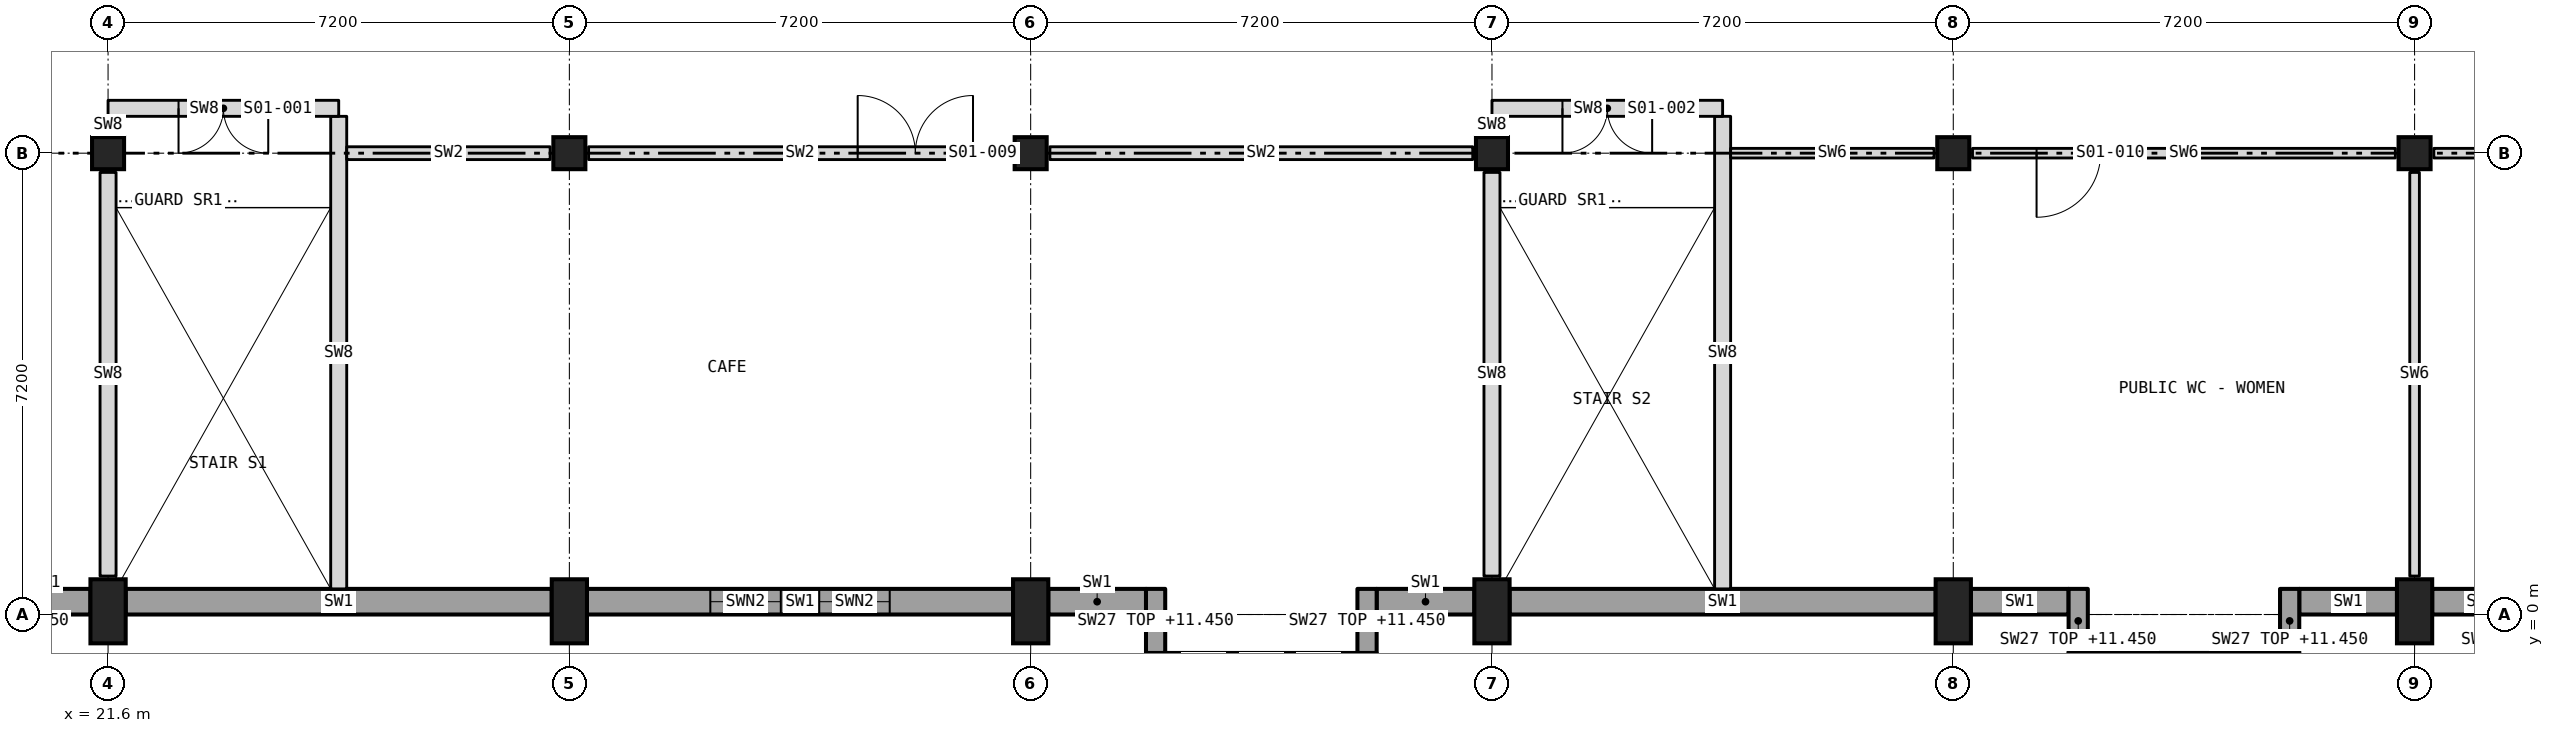
"""IFC4 building model, lengths in metres.
Left out: names, types, materials, properties, quantities, classifications, styles, units other than length and angle.
Written with IfcOpenShell. Run it as: python <this file> out.ifc"""

import sys

from ifc_helpers import new_model, si_unit, direction, frame, frame_2d, origin, origin_2d, place, context, subcontext, project, spatial, rectangle, extrude, element, fill, save


model = new_model("IFC4")
c1 = context("Model", 3, precision=1e-05, world=origin(), true_north=direction((0.0, 1.0)))
c2 = subcontext(c1, "Body", "Model", "MODEL_VIEW")
j1 = project(units=[si_unit("LENGTHUNIT", "METRE"), si_unit("PLANEANGLEUNIT", "RADIAN")], contexts=[c1])
p1 = place(None, origin())
s1 = spatial("IfcSite", under=j1, at=p1, CompositionType="ELEMENT")
p2 = place(p1, origin())
s2 = spatial("IfcBuilding", under=s1, at=p2, CompositionType="ELEMENT")
p3 = place(p2, frame((0.0, 0.0, 6.0)))
s3 = spatial("IfcBuildingStorey", under=s2, at=p3, CompositionType="ELEMENT", Elevation=6.0)
p4 = place(p3, frame((21.6, 0.05, 0.0), z_axis=(0.0, 0.0, 1.0), x_axis=(1.0, 0.0, 0.0)))
e1 = element("IfcColumn", 1, at=p4, inside=s3, PredefinedType="COLUMN", context=c2, shape_type="SweptSolid", body=[
    extrude(rectangle(XDim=0.55, YDim=1.0, at=origin_2d()), origin(), (0.0, 0.0, 1.0), 6.0),
])
p5 = place(p3, frame((21.6, 7.2, 0.0), z_axis=(0.0, 0.0, 1.0), x_axis=(1.0, 0.0, 0.0)))
e2 = element("IfcColumn", 2, at=p5, inside=s3, PredefinedType="COLUMN", context=c2, shape_type="SweptSolid", body=[
    extrude(rectangle(XDim=0.5, YDim=0.5, at=origin_2d()), origin(), (0.0, 0.0, 1.0), 6.0),
])
p6 = place(p3, frame((28.8, 0.05, 0.0), z_axis=(0.0, 0.0, 1.0), x_axis=(1.0, 0.0, 0.0)))
e3 = element("IfcColumn", 3, at=p6, inside=s3, PredefinedType="COLUMN", context=c2, shape_type="SweptSolid", body=[
    extrude(rectangle(XDim=0.55, YDim=1.0, at=origin_2d()), origin(), (0.0, 0.0, 1.0), 6.0),
])
p7 = place(p3, frame((28.8, 7.2, 0.0), z_axis=(0.0, 0.0, 1.0), x_axis=(1.0, 0.0, 0.0)))
e4 = element("IfcColumn", 4, at=p7, inside=s3, PredefinedType="COLUMN", context=c2, shape_type="SweptSolid", body=[
    extrude(rectangle(XDim=0.5, YDim=0.5, at=origin_2d()), origin(), (0.0, 0.0, 1.0), 6.0),
])
p8 = place(p3, frame((36.0, 0.05, 0.0), z_axis=(0.0, 0.0, 1.0), x_axis=(1.0, 0.0, 0.0)))
e5 = element("IfcColumn", 5, at=p8, inside=s3, PredefinedType="COLUMN", context=c2, shape_type="SweptSolid", body=[
    extrude(rectangle(XDim=0.55, YDim=1.0, at=origin_2d()), origin(), (0.0, 0.0, 1.0), 6.0),
])
p9 = place(p3, frame((36.0, 7.2, 0.0), z_axis=(0.0, 0.0, 1.0), x_axis=(1.0, 0.0, 0.0)))
e6 = element("IfcColumn", 6, at=p9, inside=s3, PredefinedType="COLUMN", context=c2, shape_type="SweptSolid", body=[
    extrude(rectangle(XDim=0.5, YDim=0.5, at=origin_2d()), origin(), (0.0, 0.0, 1.0), 6.0),
])
p10 = place(p3, frame((43.2, 0.05, 0.0), z_axis=(0.0, 0.0, 1.0), x_axis=(1.0, 0.0, 0.0)))
e7 = element("IfcColumn", 7, at=p10, inside=s3, PredefinedType="COLUMN", context=c2, shape_type="SweptSolid", body=[
    extrude(rectangle(XDim=0.55, YDim=1.0, at=origin_2d()), origin(), (0.0, 0.0, 1.0), 6.0),
])
p11 = place(p3, frame((43.2, 7.2, 0.0), z_axis=(0.0, 0.0, 1.0), x_axis=(1.0, 0.0, 0.0)))
e8 = element("IfcColumn", 8, at=p11, inside=s3, PredefinedType="COLUMN", context=c2, shape_type="SweptSolid", body=[
    extrude(rectangle(XDim=0.5, YDim=0.5, at=origin_2d()), origin(), (0.0, 0.0, 1.0), 6.0),
])
p12 = place(p3, frame((50.4, 0.05, 0.0), z_axis=(0.0, 0.0, 1.0), x_axis=(1.0, 0.0, 0.0)))
e9 = element("IfcColumn", 9, at=p12, inside=s3, PredefinedType="COLUMN", context=c2, shape_type="SweptSolid", body=[
    extrude(rectangle(XDim=0.55, YDim=1.0, at=origin_2d()), origin(), (0.0, 0.0, 1.0), 6.0),
])
p13 = place(p3, frame((50.4, 7.2, 0.0), z_axis=(0.0, 0.0, 1.0), x_axis=(1.0, 0.0, 0.0)))
e10 = element("IfcColumn", 10, at=p13, inside=s3, PredefinedType="COLUMN", context=c2, shape_type="SweptSolid", body=[
    extrude(rectangle(XDim=0.5, YDim=0.5, at=origin_2d()), origin(), (0.0, 0.0, 1.0), 6.0),
])
p14 = place(p3, frame((57.6, 0.05, 0.0), z_axis=(0.0, 0.0, 1.0), x_axis=(1.0, 0.0, 0.0)))
e11 = element("IfcColumn", 11, at=p14, inside=s3, PredefinedType="COLUMN", context=c2, shape_type="SweptSolid", body=[
    extrude(rectangle(XDim=0.55, YDim=1.0, at=origin_2d()), origin(), (0.0, 0.0, 1.0), 6.0),
])
p15 = place(p3, frame((57.6, 7.2, 0.0), z_axis=(0.0, 0.0, 1.0), x_axis=(1.0, 0.0, 0.0)))
e12 = element("IfcColumn", 12, at=p15, inside=s3, PredefinedType="COLUMN", context=c2, shape_type="SweptSolid", body=[
    extrude(rectangle(XDim=0.5, YDim=0.5, at=origin_2d()), origin(), (0.0, 0.0, 1.0), 6.0),
])
p16 = place(p3, frame((19.913, 0.2, 0.0), z_axis=(0.0, 0.0, 1.0), x_axis=(1.0, 0.0, 0.0)))
e13 = element("IfcWall", 13, at=p16, inside=s3, PredefinedType="SOLIDWALL", context=c2, shape_type="SweptSolid", body=[
    extrude(rectangle(XDim=1.412, YDim=0.4, at=frame_2d((0.706, 0.0))), origin(), (0.0, 0.0, 1.0), 5.725),
])
p17 = place(p3, frame((21.875, 0.2, 0.0), z_axis=(0.0, 0.0, 1.0), x_axis=(1.0, 0.0, 0.0)))
e14 = element("IfcWall", 14, at=p17, inside=s3, PredefinedType="SOLIDWALL", context=c2, shape_type="SweptSolid", body=[
    extrude(rectangle(XDim=6.65, YDim=0.4, at=frame_2d((3.325, 0.0))), origin(), (0.0, 0.0, 1.0), 5.725),
])
p18 = place(p3, frame((29.075, 0.2, 0.0), z_axis=(0.0, 0.0, 1.0), x_axis=(1.0, 0.0, 0.0)))
e15 = element("IfcWall", 15, at=p18, inside=s3, PredefinedType="SOLIDWALL", context=c2, shape_type="SweptSolid", body=[
    extrude(rectangle(XDim=6.65, YDim=0.4, at=frame_2d((3.325, 0.0))), origin(), (0.0, 0.0, 1.0), 5.725),
])
p19 = place(p18, frame((1.925, 0.0, 0.9)))
e16 = element("IfcOpeningElement", 16, at=p19, cuts=e15, PredefinedType="OPENING", context=c2, shape_type="SweptSolid", body=[
    extrude(rectangle(XDim=1.1, YDim=2.4, at=frame_2d((0.55, 1.2))), frame((0.0, 0.21, 0.0), z_axis=(0.0, -1.0, 0.0), x_axis=(1.0, 0.0, 0.0)), (0.0, 0.0, 1.0), 0.42),
])
p20 = place(p18, frame((3.625, 0.0, 0.9)))
e17 = element("IfcOpeningElement", 17, at=p20, cuts=e15, PredefinedType="OPENING", context=c2, shape_type="SweptSolid", body=[
    extrude(rectangle(XDim=1.1, YDim=2.4, at=frame_2d((0.55, 1.2))), frame((0.0, 0.21, 0.0), z_axis=(0.0, -1.0, 0.0), x_axis=(1.0, 0.0, 0.0)), (0.0, 0.0, 1.0), 0.42),
])
for number, where, z_axis, x_axis in (
    (18, (36.275, 0.2, 0.0), (0.0, 0.0, 1.0), (1.0, 0.0, 0.0)),
    (19, (41.4, 0.2, 0.0), (0.0, 0.0, 1.0), (1.0, 0.0, 0.0)),
):
    element("IfcWall", number, at=place(p3, frame(where, z_axis=z_axis, x_axis=x_axis)), inside=s3, PredefinedType="SOLIDWALL", context=c2, shape_type="SweptSolid", body=[
        extrude(rectangle(XDim=1.525, YDim=0.4, at=frame_2d((0.763, 0.0))), origin(), (0.0, 0.0, 1.0), 5.725),
    ])
p21 = place(p3, frame((43.475, 0.2, 0.0), z_axis=(0.0, 0.0, 1.0), x_axis=(1.0, 0.0, 0.0)))
e20 = element("IfcWall", 20, at=p21, inside=s3, PredefinedType="SOLIDWALL", context=c2, shape_type="SweptSolid", body=[
    extrude(rectangle(XDim=6.65, YDim=0.4, at=frame_2d((3.325, 0.0))), origin(), (0.0, 0.0, 1.0), 5.725),
])
for number, where, z_axis, x_axis in (
    (21, (50.675, 0.2, 0.0), (0.0, 0.0, 1.0), (1.0, 0.0, 0.0)),
    (22, (55.8, 0.2, 0.0), (0.0, 0.0, 1.0), (1.0, 0.0, 0.0)),
    (23, (57.875, 0.2, 0.0), (0.0, 0.0, 1.0), (1.0, 0.0, 0.0)),
):
    element("IfcWall", number, at=place(p3, frame(where, z_axis=z_axis, x_axis=x_axis)), inside=s3, PredefinedType="SOLIDWALL", context=c2, shape_type="SweptSolid", body=[
        extrude(rectangle(XDim=1.525, YDim=0.4, at=frame_2d((0.762, 0.0))), origin(), (0.0, 0.0, 1.0), 5.725),
    ])
p22 = place(p3, frame((37.8, -0.75, 0.0), z_axis=(0.0, 0.0, 1.0), x_axis=(1.0, 0.0, 0.0)))
e24 = element("IfcWall", 24, at=p22, inside=s3, PredefinedType="SOLIDWALL", context=c2, shape_type="SweptSolid", body=[
    extrude(rectangle(XDim=3.6, YDim=0.3, at=frame_2d((1.8, 0.0))), origin(), (0.0, 0.0, 1.0), 5.45),
])
p23 = place(p22, frame((0.3, 0.0, 0.9)))
e25 = element("IfcOpeningElement", 25, at=p23, cuts=e24, PredefinedType="OPENING", context=c2, shape_type="SweptSolid", body=[
    extrude(rectangle(XDim=1.2, YDim=3.6, at=frame_2d((0.6, 1.8))), frame((0.0, 0.16, 0.0), z_axis=(0.0, -1.0, 0.0), x_axis=(1.0, 0.0, 0.0)), (0.0, 0.0, 1.0), 0.32),
])
p24 = place(p22, frame((2.1, 0.0, 0.9)))
e26 = element("IfcOpeningElement", 26, at=p24, cuts=e24, PredefinedType="OPENING", context=c2, shape_type="SweptSolid", body=[
    extrude(rectangle(XDim=1.2, YDim=3.6, at=frame_2d((0.6, 1.8))), frame((0.0, 0.16, 0.0), z_axis=(0.0, -1.0, 0.0), x_axis=(1.0, 0.0, 0.0)), (0.0, 0.0, 1.0), 0.32),
])
for number, where, z_axis, x_axis in (
    (27, (37.95, -0.6, 0.0), (0.0, 0.0, 1.0), (0.0, 1.0, 0.0)),
    (28, (41.25, -0.6, 0.0), (0.0, 0.0, 1.0), (0.0, 1.0, 0.0)),
):
    element("IfcWall", number, at=place(p3, frame(where, z_axis=z_axis, x_axis=x_axis)), inside=s3, PredefinedType="SOLIDWALL", context=c2, shape_type="SweptSolid", body=[
        extrude(rectangle(XDim=1.0, YDim=0.3, at=frame_2d((0.5, 0.0))), origin(), (0.0, 0.0, 1.0), 5.45),
    ])
p25 = place(p3, frame((52.2, -0.75, 0.0), z_axis=(0.0, 0.0, 1.0), x_axis=(1.0, 0.0, 0.0)))
e29 = element("IfcWall", 29, at=p25, inside=s3, PredefinedType="SOLIDWALL", context=c2, shape_type="SweptSolid", body=[
    extrude(rectangle(XDim=3.6, YDim=0.3, at=frame_2d((1.8, 0.0))), origin(), (0.0, 0.0, 1.0), 5.45),
])
p26 = place(p25, frame((0.3, 0.0, 0.9)))
e30 = element("IfcOpeningElement", 30, at=p26, cuts=e29, PredefinedType="OPENING", context=c2, shape_type="SweptSolid", body=[
    extrude(rectangle(XDim=1.2, YDim=3.6, at=frame_2d((0.6, 1.8))), frame((0.0, 0.16, 0.0), z_axis=(0.0, -1.0, 0.0), x_axis=(1.0, 0.0, 0.0)), (0.0, 0.0, 1.0), 0.32),
])
p27 = place(p25, frame((2.1, 0.0, 0.9)))
e31 = element("IfcOpeningElement", 31, at=p27, cuts=e29, PredefinedType="OPENING", context=c2, shape_type="SweptSolid", body=[
    extrude(rectangle(XDim=1.2, YDim=3.6, at=frame_2d((0.6, 1.8))), frame((0.0, 0.16, 0.0), z_axis=(0.0, -1.0, 0.0), x_axis=(1.0, 0.0, 0.0)), (0.0, 0.0, 1.0), 0.32),
])
for number, where, z_axis, x_axis in (
    (32, (52.35, -0.6, 0.0), (0.0, 0.0, 1.0), (0.0, 1.0, 0.0)),
    (33, (55.65, -0.6, 0.0), (0.0, 0.0, 1.0), (0.0, 1.0, 0.0)),
):
    element("IfcWall", number, at=place(p3, frame(where, z_axis=z_axis, x_axis=x_axis)), inside=s3, PredefinedType="SOLIDWALL", context=c2, shape_type="SweptSolid", body=[
        extrude(rectangle(XDim=1.0, YDim=0.3, at=frame_2d((0.5, 0.0))), origin(), (0.0, 0.0, 1.0), 5.45),
    ])
p28 = place(p3, frame((21.6, 0.6, 0.0), z_axis=(0.0, 0.0, 1.0), x_axis=(0.0, 1.0, 0.0)))
e34 = element("IfcWall", 34, at=p28, inside=s3, PredefinedType="SOLIDWALL", context=c2, shape_type="SweptSolid", body=[
    extrude(rectangle(XDim=6.3, YDim=0.25, at=frame_2d((3.15, 0.0))), origin(), (0.0, 0.0, 1.0), 5.725),
])
p29 = place(p3, frame((21.6, 7.5, 0.0), z_axis=(0.0, 0.0, 1.0), x_axis=(0.0, 1.0, 0.0)))
e35 = element("IfcWall", 35, at=p29, inside=s3, PredefinedType="SOLIDWALL", context=c2, shape_type="SweptSolid", body=[
    extrude(rectangle(XDim=0.275, YDim=0.25, at=frame_2d((0.137, 0.0))), origin(), (0.0, 0.0, 1.0), 5.725),
])
p30 = place(p3, frame((25.2, 0.4, 0.0), z_axis=(0.0, 0.0, 1.0), x_axis=(0.0, 1.0, 0.0)))
e36 = element("IfcWall", 36, at=p30, inside=s3, PredefinedType="SOLIDWALL", context=c2, shape_type="SweptSolid", body=[
    extrude(rectangle(XDim=7.375, YDim=0.25, at=frame_2d((3.688, 0.0))), origin(), (0.0, 0.0, 1.0), 5.725),
])
p31 = place(p3, frame((43.2, 0.6, 0.0), z_axis=(0.0, 0.0, 1.0), x_axis=(0.0, 1.0, 0.0)))
e37 = element("IfcWall", 37, at=p31, inside=s3, PredefinedType="SOLIDWALL", context=c2, shape_type="SweptSolid", body=[
    extrude(rectangle(XDim=6.3, YDim=0.25, at=frame_2d((3.15, 0.0))), origin(), (0.0, 0.0, 1.0), 5.725),
])
p32 = place(p3, frame((43.2, 7.5, 0.0), z_axis=(0.0, 0.0, 1.0), x_axis=(0.0, 1.0, 0.0)))
e38 = element("IfcWall", 38, at=p32, inside=s3, PredefinedType="SOLIDWALL", context=c2, shape_type="SweptSolid", body=[
    extrude(rectangle(XDim=0.275, YDim=0.25, at=frame_2d((0.137, 0.0))), origin(), (0.0, 0.0, 1.0), 5.725),
])
p33 = place(p3, frame((46.8, 0.4, 0.0), z_axis=(0.0, 0.0, 1.0), x_axis=(0.0, 1.0, 0.0)))
e39 = element("IfcWall", 39, at=p33, inside=s3, PredefinedType="SOLIDWALL", context=c2, shape_type="SweptSolid", body=[
    extrude(rectangle(XDim=7.375, YDim=0.25, at=frame_2d((3.688, 0.0))), origin(), (0.0, 0.0, 1.0), 5.725),
])
p34 = place(p3, frame((57.6, 0.6, 0.0), z_axis=(0.0, 0.0, 1.0), x_axis=(0.0, 1.0, 0.0)))
e40 = element("IfcWall", 40, at=p34, inside=s3, PredefinedType="PARTITIONING", context=c2, shape_type="SweptSolid", body=[
    extrude(rectangle(XDim=6.3, YDim=0.15, at=frame_2d((3.15, 0.0))), origin(), (0.0, 0.0, 1.0), 5.725),
])
p35 = place(p3, frame((46.925, 7.2, 0.0), z_axis=(0.0, 0.0, 1.0), x_axis=(1.0, 0.0, 0.0)))
e41 = element("IfcWall", 41, at=p35, inside=s3, PredefinedType="PARTITIONING", context=c2, shape_type="SweptSolid", body=[
    extrude(rectangle(XDim=3.175, YDim=0.15, at=frame_2d((1.587, 0.0))), origin(), (0.0, 0.0, 1.0), 5.725),
])
p36 = place(p3, frame((50.7, 7.2, 0.0), z_axis=(0.0, 0.0, 1.0), x_axis=(1.0, 0.0, 0.0)))
e42 = element("IfcWall", 42, at=p36, inside=s3, PredefinedType="PARTITIONING", context=c2, shape_type="SweptSolid", body=[
    extrude(rectangle(XDim=6.6, YDim=0.15, at=frame_2d((3.3, 0.0))), origin(), (0.0, 0.0, 1.0), 5.725),
])
p37 = place(p36, frame((1.0, 0.0, 0.0)))
e43 = element("IfcOpeningElement", 43, at=p37, cuts=e42, PredefinedType="OPENING", context=c2, shape_type="SweptSolid", body=[
    extrude(rectangle(XDim=1.0, YDim=2.1, at=frame_2d((0.5, 1.05))), frame((0.0, 0.085, 0.0), z_axis=(0.0, -1.0, 0.0), x_axis=(1.0, 0.0, 0.0)), (0.0, 0.0, 1.0), 0.17),
])
p38 = place(p3, frame((57.9, 7.2, 0.0), z_axis=(0.0, 0.0, 1.0), x_axis=(1.0, 0.0, 0.0)))
e44 = element("IfcWall", 44, at=p38, inside=s3, PredefinedType="PARTITIONING", context=c2, shape_type="SweptSolid", body=[
    extrude(rectangle(XDim=6.6, YDim=0.15, at=frame_2d((3.3, 0.0))), origin(), (0.0, 0.0, 1.0), 5.725),
])
p39 = place(p38, frame((2.8, 0.0, 0.0)))
e45 = element("IfcOpeningElement", 45, at=p39, cuts=e44, PredefinedType="OPENING", context=c2, shape_type="SweptSolid", body=[
    extrude(rectangle(XDim=1.0, YDim=2.1, at=frame_2d((0.5, 1.05))), frame((0.0, 0.085, 0.0), z_axis=(0.0, -1.0, 0.0), x_axis=(1.0, 0.0, 0.0)), (0.0, 0.0, 1.0), 0.17),
])
p40 = place(p3, frame((25.325, 7.2, 0.0), z_axis=(0.0, 0.0, 1.0), x_axis=(1.0, 0.0, 0.0)))
e46 = element("IfcWall", 46, at=p40, inside=s3, PredefinedType="PARTITIONING", context=c2, shape_type="SweptSolid", body=[
    extrude(rectangle(XDim=3.175, YDim=0.2, at=frame_2d((1.587, 0.0))), origin(), (0.0, 0.0, 1.0), 5.725),
])
p41 = place(p3, frame((29.1, 7.2, 0.0), z_axis=(0.0, 0.0, 1.0), x_axis=(1.0, 0.0, 0.0)))
e47 = element("IfcWall", 47, at=p41, inside=s3, PredefinedType="PARTITIONING", context=c2, shape_type="SweptSolid", body=[
    extrude(rectangle(XDim=6.6, YDim=0.2, at=frame_2d((3.3, 0.0))), origin(), (0.0, 0.0, 1.0), 5.725),
])
p42 = place(p41, frame((4.2, 0.0, 0.0)))
e48 = element("IfcOpeningElement", 48, at=p42, cuts=e47, PredefinedType="OPENING", context=c2, shape_type="SweptSolid", body=[
    extrude(rectangle(XDim=1.8, YDim=2.1, at=frame_2d((0.9, 1.05))), frame((0.0, 0.11, 0.0), z_axis=(0.0, -1.0, 0.0), x_axis=(1.0, 0.0, 0.0)), (0.0, 0.0, 1.0), 0.22),
])
p43 = place(p3, frame((36.3, 7.2, 0.0), z_axis=(0.0, 0.0, 1.0), x_axis=(1.0, 0.0, 0.0)))
e49 = element("IfcWall", 49, at=p43, inside=s3, PredefinedType="PARTITIONING", context=c2, shape_type="SweptSolid", body=[
    extrude(rectangle(XDim=6.6, YDim=0.2, at=frame_2d((3.3, 0.0))), origin(), (0.0, 0.0, 1.0), 5.725),
])
p44 = place(p3, frame((21.6, 7.9, 0.0), z_axis=(0.0, 0.0, 1.0), x_axis=(1.0, 0.0, 0.0)))
e50 = element("IfcWall", 50, at=p44, inside=s3, PredefinedType="SOLIDWALL", context=c2, shape_type="SweptSolid", body=[
    extrude(rectangle(XDim=3.6, YDim=0.25, at=frame_2d((1.8, 0.0))), origin(), (0.0, 0.0, 1.0), 5.725),
])
p45 = place(p44, frame((1.1, 0.0, 0.0)))
e51 = element("IfcOpeningElement", 51, at=p45, cuts=e50, PredefinedType="OPENING", context=c2, shape_type="SweptSolid", body=[
    extrude(rectangle(XDim=1.4, YDim=2.1, at=frame_2d((0.7, 1.05))), frame((0.0, 0.135, 0.0), z_axis=(0.0, -1.0, 0.0), x_axis=(1.0, 0.0, 0.0)), (0.0, 0.0, 1.0), 0.27),
])
p46 = place(p3, frame((43.2, 7.9, 0.0), z_axis=(0.0, 0.0, 1.0), x_axis=(1.0, 0.0, 0.0)))
e52 = element("IfcWall", 52, at=p46, inside=s3, PredefinedType="SOLIDWALL", context=c2, shape_type="SweptSolid", body=[
    extrude(rectangle(XDim=3.6, YDim=0.25, at=frame_2d((1.8, 0.0))), origin(), (0.0, 0.0, 1.0), 5.725),
])
p47 = place(p46, frame((1.1, 0.0, 0.0)))
e53 = element("IfcOpeningElement", 53, at=p47, cuts=e52, PredefinedType="OPENING", context=c2, shape_type="SweptSolid", body=[
    extrude(rectangle(XDim=1.4, YDim=2.1, at=frame_2d((0.7, 1.05))), frame((0.0, 0.135, 0.0), z_axis=(0.0, -1.0, 0.0), x_axis=(1.0, 0.0, 0.0)), (0.0, 0.0, 1.0), 0.27),
])
p48 = place(p19, origin())
e54 = element("IfcWindow", 54, at=p48, inside=s3, PartitioningType="DOUBLE_PANEL_VERTICAL", PredefinedType="WINDOW", context=c2, shape_type="SweptSolid", body=[
    extrude(rectangle(XDim=1.1, YDim=2.4, at=frame_2d((0.55, 1.2))), frame((0.0, 0.16, 0.0), z_axis=(0.0, -1.0, 0.0), x_axis=(1.0, 0.0, 0.0)), (0.0, 0.0, 1.0), 0.06),
])
fill(e16, e54)
p49 = place(p20, origin())
e55 = element("IfcWindow", 55, at=p49, inside=s3, PartitioningType="DOUBLE_PANEL_VERTICAL", PredefinedType="WINDOW", context=c2, shape_type="SweptSolid", body=[
    extrude(rectangle(XDim=1.1, YDim=2.4, at=frame_2d((0.55, 1.2))), frame((0.0, 0.16, 0.0), z_axis=(0.0, -1.0, 0.0), x_axis=(1.0, 0.0, 0.0)), (0.0, 0.0, 1.0), 0.06),
])
fill(e17, e55)
p50 = place(p45, frame((1.4, 0.0, 0.0), z_axis=(0.0, 0.0, 1.0), x_axis=(-1.0, 0.0, 0.0)))
e56 = element("IfcDoor", 56, at=p50, inside=s3, OperationType="DOUBLE_DOOR_SINGLE_SWING", PredefinedType="DOOR", context=c2, shape_type="SweptSolid", body=[
    extrude(rectangle(XDim=1.4, YDim=2.1, at=frame_2d((0.7, 1.05))), frame((0.0, 0.025, 0.0), z_axis=(0.0, -1.0, 0.0), x_axis=(1.0, 0.0, 0.0)), (0.0, 0.0, 1.0), 0.05),
])
fill(e51, e56)
p51 = place(p47, frame((1.4, 0.0, 0.0), z_axis=(0.0, 0.0, 1.0), x_axis=(-1.0, 0.0, 0.0)))
e57 = element("IfcDoor", 57, at=p51, inside=s3, OperationType="DOUBLE_DOOR_SINGLE_SWING", PredefinedType="DOOR", context=c2, shape_type="SweptSolid", body=[
    extrude(rectangle(XDim=1.4, YDim=2.1, at=frame_2d((0.7, 1.05))), frame((0.0, 0.025, 0.0), z_axis=(0.0, -1.0, 0.0), x_axis=(1.0, 0.0, 0.0)), (0.0, 0.0, 1.0), 0.05),
])
fill(e53, e57)
p52 = place(p42, origin())
e58 = element("IfcDoor", 58, at=p52, inside=s3, OperationType="DOUBLE_DOOR_SINGLE_SWING", PredefinedType="DOOR", context=c2, shape_type="SweptSolid", body=[
    extrude(rectangle(XDim=1.8, YDim=2.1, at=frame_2d((0.9, 1.05))), frame((0.0, 0.025, 0.0), z_axis=(0.0, -1.0, 0.0), x_axis=(1.0, 0.0, 0.0)), (0.0, 0.0, 1.0), 0.05),
])
fill(e48, e58)
p53 = place(p37, frame((1.0, 0.0, 0.0), z_axis=(0.0, 0.0, 1.0), x_axis=(-1.0, 0.0, 0.0)))
e59 = element("IfcDoor", 59, at=p53, inside=s3, OperationType="SINGLE_SWING_RIGHT", PredefinedType="DOOR", context=c2, shape_type="SweptSolid", body=[
    extrude(rectangle(XDim=1.0, YDim=2.1, at=frame_2d((0.5, 1.05))), frame((0.0, 0.025, 0.0), z_axis=(0.0, -1.0, 0.0), x_axis=(1.0, 0.0, 0.0)), (0.0, 0.0, 1.0), 0.05),
])
fill(e43, e59)
save(model, sys.argv[1])
